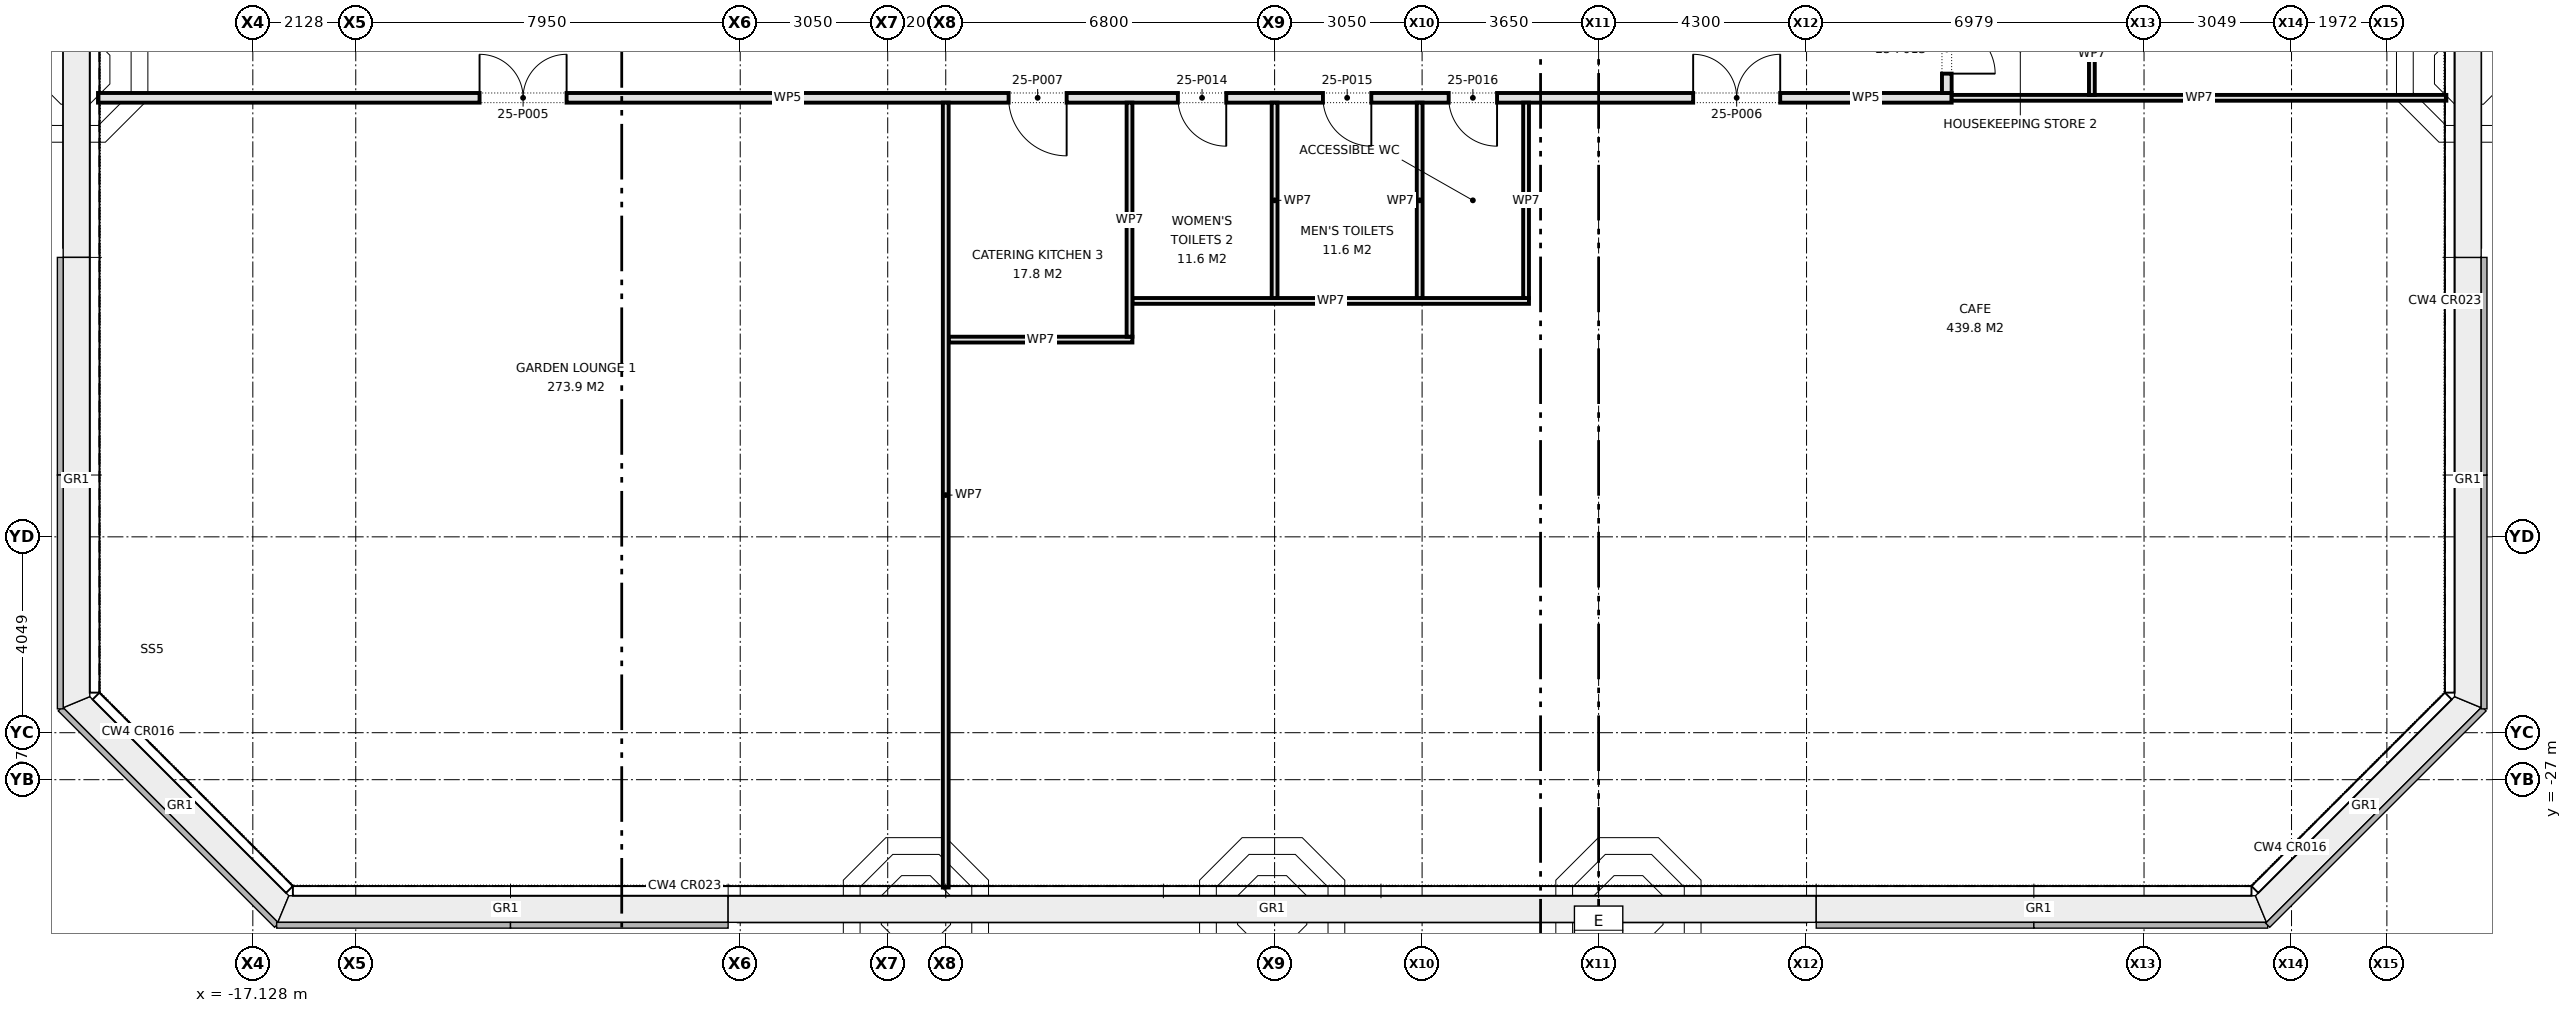
"""IFC4 building model, lengths in metres.
Left out: names, types, materials, properties, quantities, classifications, styles, units other than length and angle.
Written with IfcOpenShell. Run it as: python <this file> out.ifc"""

import sys

from ifc_helpers import new_model, si_unit, direction, frame, frame_2d, origin, place, context, subcontext, project, spatial, rectangle, extrude, element, fill, save


model = new_model("IFC4")
c1 = context("Model", 3, precision=1e-05, world=origin(), true_north=direction((0.0, 1.0)))
c2 = subcontext(c1, "Body", "Model", "MODEL_VIEW")
j1 = project(units=[si_unit("LENGTHUNIT", "METRE"), si_unit("PLANEANGLEUNIT", "RADIAN")], contexts=[c1])
p1 = place(None, origin())
s1 = spatial("IfcSite", under=j1, at=p1, CompositionType="ELEMENT")
p2 = place(p1, origin())
s2 = spatial("IfcBuilding", under=s1, at=p2, CompositionType="ELEMENT")
p3 = place(p2, frame((0.0, 0.0, 112.8)))
s3 = spatial("IfcBuildingStorey", under=s2, at=p3, CompositionType="ELEMENT", Elevation=112.8)
p4 = place(p3, frame((-20.33, -12.9, 0.0), z_axis=(0.0, 0.0, 1.0), x_axis=(1.0, 0.0, 0.0)))
e1 = element("IfcWall", 1, at=p4, inside=s3, PredefinedType="PARTITIONING", context=c2, shape_type="SweptSolid", body=[
    extrude(rectangle(XDim=38.33, YDim=0.2, at=frame_2d((19.165, 0.0))), origin(), (0.0, 0.0, 1.0), 7.35),
])
p5 = place(p4, frame((7.89, 0.0, 0.0)))
e2 = element("IfcOpeningElement", 2, at=p5, cuts=e1, PredefinedType="OPENING", context=c2, shape_type="SweptSolid", body=[
    extrude(rectangle(XDim=1.8, YDim=2.1, at=frame_2d((0.9, 1.05))), frame((0.0, 0.11, 0.0), z_axis=(0.0, -1.0, 0.0), x_axis=(1.0, 0.0, 0.0)), (0.0, 0.0, 1.0), 0.22),
])
p6 = place(p4, frame((32.985, 0.0, 0.0)))
e3 = element("IfcOpeningElement", 3, at=p6, cuts=e1, PredefinedType="OPENING", context=c2, shape_type="SweptSolid", body=[
    extrude(rectangle(XDim=1.8, YDim=2.1, at=frame_2d((0.9, 1.05))), frame((0.0, 0.11, 0.0), z_axis=(0.0, -1.0, 0.0), x_axis=(1.0, 0.0, 0.0)), (0.0, 0.0, 1.0), 0.22),
])
p7 = place(p4, frame((18.83, 0.0, 0.0)))
e4 = element("IfcOpeningElement", 4, at=p7, cuts=e1, PredefinedType="OPENING", context=c2, shape_type="SweptSolid", body=[
    extrude(rectangle(XDim=1.2, YDim=2.1, at=frame_2d((0.6, 1.05))), frame((0.0, 0.11, 0.0), z_axis=(0.0, -1.0, 0.0), x_axis=(1.0, 0.0, 0.0)), (0.0, 0.0, 1.0), 0.22),
])
p8 = place(p4, frame((22.33, 0.0, 0.0)))
e5 = element("IfcOpeningElement", 5, at=p8, cuts=e1, PredefinedType="OPENING", context=c2, shape_type="SweptSolid", body=[
    extrude(rectangle(XDim=1.0, YDim=2.1, at=frame_2d((0.5, 1.05))), frame((0.0, 0.11, 0.0), z_axis=(0.0, -1.0, 0.0), x_axis=(1.0, 0.0, 0.0)), (0.0, 0.0, 1.0), 0.22),
])
p9 = place(p4, frame((25.33, 0.0, 0.0)))
e6 = element("IfcOpeningElement", 6, at=p9, cuts=e1, PredefinedType="OPENING", context=c2, shape_type="SweptSolid", body=[
    extrude(rectangle(XDim=1.0, YDim=2.1, at=frame_2d((0.5, 1.05))), frame((0.0, 0.11, 0.0), z_axis=(0.0, -1.0, 0.0), x_axis=(1.0, 0.0, 0.0)), (0.0, 0.0, 1.0), 0.22),
])
p10 = place(p4, frame((27.93, 0.0, 0.0)))
e7 = element("IfcOpeningElement", 7, at=p10, cuts=e1, PredefinedType="OPENING", context=c2, shape_type="SweptSolid", body=[
    extrude(rectangle(XDim=1.0, YDim=2.1, at=frame_2d((0.5, 1.05))), frame((0.0, 0.11, 0.0), z_axis=(0.0, -1.0, 0.0), x_axis=(1.0, 0.0, 0.0)), (0.0, 0.0, 1.0), 0.22),
])
p11 = place(p3, frame((17.9, -12.8, 0.0), z_axis=(0.0, 0.0, 1.0), x_axis=(0.0, 1.0, 0.0)))
e8 = element("IfcWall", 8, at=p11, inside=s3, PredefinedType="PARTITIONING", context=c2, shape_type="SweptSolid", body=[
    extrude(rectangle(XDim=25.6, YDim=0.2, at=frame_2d((12.8, 0.0))), origin(), (0.0, 0.0, 1.0), 7.35),
])
p12 = place(p11, frame((11.85, 0.0, 0.0)))
e9 = element("IfcOpeningElement", 9, at=p12, cuts=e8, PredefinedType="OPENING", context=c2, shape_type="SweptSolid", body=[
    extrude(rectangle(XDim=1.8, YDim=2.1, at=frame_2d((0.9, 1.05))), frame((0.0, 0.11, 0.0), z_axis=(0.0, -1.0, 0.0), x_axis=(1.0, 0.0, 0.0)), (0.0, 0.0, 1.0), 0.22),
])
p13 = place(p11, frame((0.4, 0.0, 0.0)))
e10 = element("IfcOpeningElement", 10, at=p13, cuts=e8, PredefinedType="OPENING", context=c2, shape_type="SweptSolid", body=[
    extrude(rectangle(XDim=1.0, YDim=2.1, at=frame_2d((0.5, 1.05))), frame((0.0, 0.11, 0.0), z_axis=(0.0, -1.0, 0.0), x_axis=(1.0, 0.0, 0.0)), (0.0, 0.0, 1.0), 0.22),
])
p14 = place(p3, frame((-2.74, -17.9, 0.0), z_axis=(0.0, 0.0, 1.0), x_axis=(1.0, 0.0, 0.0)))
e11 = element("IfcWall", 11, at=p14, inside=s3, PredefinedType="PARTITIONING", context=c2, shape_type="SweptSolid", body=[
    extrude(rectangle(XDim=3.8, YDim=0.12, at=frame_2d((1.9, 0.0))), origin(), (0.0, 0.0, 1.0), 7.35),
])
p15 = place(p3, frame((1.06, -17.1, 0.0), z_axis=(0.0, 0.0, 1.0), x_axis=(1.0, 0.0, 0.0)))
e12 = element("IfcWall", 12, at=p15, inside=s3, PredefinedType="PARTITIONING", context=c2, shape_type="SweptSolid", body=[
    extrude(rectangle(XDim=8.2, YDim=0.12, at=frame_2d((4.1, 0.0))), origin(), (0.0, 0.0, 1.0), 7.35),
])
p16 = place(p3, frame((18.0, -12.9, 0.0), z_axis=(0.0, 0.0, 1.0), x_axis=(1.0, 0.0, 0.0)))
e13 = element("IfcWall", 13, at=p16, inside=s3, PredefinedType="PARTITIONING", context=c2, shape_type="SweptSolid", body=[
    extrude(rectangle(XDim=10.23, YDim=0.12, at=frame_2d((5.115, 0.0))), origin(), (0.0, 0.0, 1.0), 7.35),
])
p17 = place(p3, frame((20.9, -12.84, 0.0), z_axis=(0.0, 0.0, 1.0), x_axis=(0.0, 1.0, 0.0)))
e14 = element("IfcWall", 14, at=p17, inside=s3, PredefinedType="PARTITIONING", context=c2, shape_type="SweptSolid", body=[
    extrude(rectangle(XDim=1.88, YDim=0.12, at=frame_2d((0.94, 0.0))), origin(), (0.0, 0.0, 1.0), 7.35),
])
for number, where, z_axis, x_axis in (
    (15, (9.2, -17.04, 0.0), (0.0, 0.0, 1.0), (0.0, 1.0, 0.0)),
    (16, (7.0, -17.04, 0.0), (0.0, 0.0, 1.0), (0.0, 1.0, 0.0)),
    (17, (4.0, -17.04, 0.0), (0.0, 0.0, 1.0), (0.0, 1.0, 0.0)),
):
    element("IfcWall", number, at=place(p3, frame(where, z_axis=z_axis, x_axis=x_axis)), inside=s3, PredefinedType="PARTITIONING", context=c2, shape_type="SweptSolid", body=[
        extrude(rectangle(XDim=4.04, YDim=0.12, at=frame_2d((2.02, 0.0))), origin(), (0.0, 0.0, 1.0), 7.35),
    ])
p18 = place(p3, frame((1.0, -17.84, 0.0), z_axis=(0.0, 0.0, 1.0), x_axis=(0.0, 1.0, 0.0)))
e18 = element("IfcWall", 18, at=p18, inside=s3, PredefinedType="PARTITIONING", context=c2, shape_type="SweptSolid", body=[
    extrude(rectangle(XDim=4.84, YDim=0.12, at=frame_2d((2.42, 0.0))), origin(), (0.0, 0.0, 1.0), 7.35),
])
p19 = place(p3, frame((-2.8, -29.23, 0.0), z_axis=(0.0, 0.0, 1.0), x_axis=(0.0, 1.0, 0.0)))
e19 = element("IfcWall", 19, at=p19, inside=s3, PredefinedType="PARTITIONING", context=c2, shape_type="SweptSolid", body=[
    extrude(rectangle(XDim=16.23, YDim=0.12, at=frame_2d((8.115, 0.0))), origin(), (0.0, 0.0, 1.0), 7.35),
])
p20 = place(p5, origin())
e20 = element("IfcDoor", 20, at=p20, inside=s3, OperationType="DOUBLE_DOOR_SINGLE_SWING", PredefinedType="DOOR", context=c2, shape_type="SweptSolid", body=[
    extrude(rectangle(XDim=1.8, YDim=2.1, at=frame_2d((0.9, 1.05))), frame((0.0, 0.025, 0.0), z_axis=(0.0, -1.0, 0.0), x_axis=(1.0, 0.0, 0.0)), (0.0, 0.0, 1.0), 0.05),
])
fill(e2, e20)
p21 = place(p6, origin())
e21 = element("IfcDoor", 21, at=p21, inside=s3, OperationType="DOUBLE_DOOR_SINGLE_SWING", PredefinedType="DOOR", context=c2, shape_type="SweptSolid", body=[
    extrude(rectangle(XDim=1.8, YDim=2.1, at=frame_2d((0.9, 1.05))), frame((0.0, 0.025, 0.0), z_axis=(0.0, -1.0, 0.0), x_axis=(1.0, 0.0, 0.0)), (0.0, 0.0, 1.0), 0.05),
])
fill(e3, e21)
p22 = place(p7, frame((1.2, 0.0, 0.0), z_axis=(0.0, 0.0, 1.0), x_axis=(-1.0, 0.0, 0.0)))
e22 = element("IfcDoor", 22, at=p22, inside=s3, OperationType="SINGLE_SWING_LEFT", PredefinedType="DOOR", context=c2, shape_type="SweptSolid", body=[
    extrude(rectangle(XDim=1.2, YDim=2.1, at=frame_2d((0.6, 1.05))), frame((0.0, 0.025, 0.0), z_axis=(0.0, -1.0, 0.0), x_axis=(1.0, 0.0, 0.0)), (0.0, 0.0, 1.0), 0.05),
])
fill(e4, e22)
p23 = place(p13, frame((1.0, 0.0, 0.0), z_axis=(0.0, 0.0, 1.0), x_axis=(-1.0, 0.0, 0.0)))
e23 = element("IfcDoor", 23, at=p23, inside=s3, OperationType="SINGLE_SWING_RIGHT", PredefinedType="DOOR", context=c2, shape_type="SweptSolid", body=[
    extrude(rectangle(XDim=1.0, YDim=2.1, at=frame_2d((0.5, 1.05))), frame((0.0, 0.025, 0.0), z_axis=(0.0, -1.0, 0.0), x_axis=(1.0, 0.0, 0.0)), (0.0, 0.0, 1.0), 0.05),
])
fill(e10, e23)
p24 = place(p8, frame((1.0, 0.0, 0.0), z_axis=(0.0, 0.0, 1.0), x_axis=(-1.0, 0.0, 0.0)))
e24 = element("IfcDoor", 24, at=p24, inside=s3, OperationType="SINGLE_SWING_LEFT", PredefinedType="DOOR", context=c2, shape_type="SweptSolid", body=[
    extrude(rectangle(XDim=1.0, YDim=2.1, at=frame_2d((0.5, 1.05))), frame((0.0, 0.025, 0.0), z_axis=(0.0, -1.0, 0.0), x_axis=(1.0, 0.0, 0.0)), (0.0, 0.0, 1.0), 0.05),
])
fill(e5, e24)
p25 = place(p9, frame((1.0, 0.0, 0.0), z_axis=(0.0, 0.0, 1.0), x_axis=(-1.0, 0.0, 0.0)))
e25 = element("IfcDoor", 25, at=p25, inside=s3, OperationType="SINGLE_SWING_LEFT", PredefinedType="DOOR", context=c2, shape_type="SweptSolid", body=[
    extrude(rectangle(XDim=1.0, YDim=2.1, at=frame_2d((0.5, 1.05))), frame((0.0, 0.025, 0.0), z_axis=(0.0, -1.0, 0.0), x_axis=(1.0, 0.0, 0.0)), (0.0, 0.0, 1.0), 0.05),
])
fill(e6, e25)
p26 = place(p10, frame((1.0, 0.0, 0.0), z_axis=(0.0, 0.0, 1.0), x_axis=(-1.0, 0.0, 0.0)))
e26 = element("IfcDoor", 26, at=p26, inside=s3, OperationType="SINGLE_SWING_LEFT", PredefinedType="DOOR", context=c2, shape_type="SweptSolid", body=[
    extrude(rectangle(XDim=1.0, YDim=2.1, at=frame_2d((0.5, 1.05))), frame((0.0, 0.025, 0.0), z_axis=(0.0, -1.0, 0.0), x_axis=(1.0, 0.0, 0.0)), (0.0, 0.0, 1.0), 0.05),
])
fill(e7, e26)
save(model, sys.argv[1])
